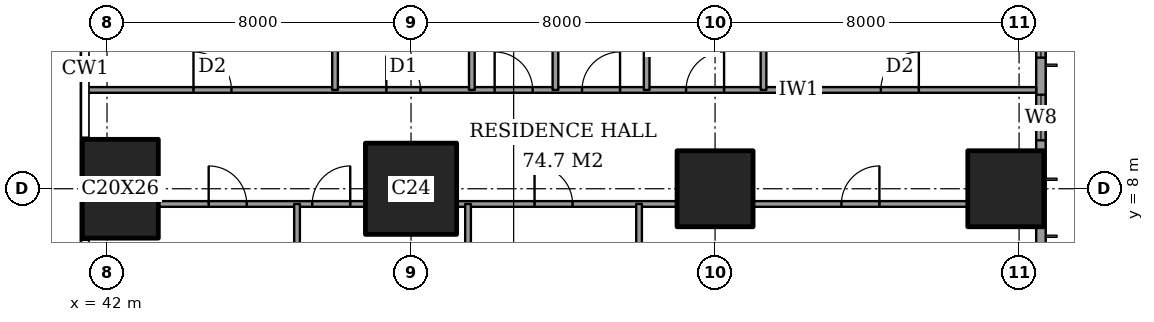
"""IFC4 building model, lengths in metres.
Left out: names, types, materials, properties, quantities, classifications, styles, units other than length and angle.
Written with IfcOpenShell. Run it as: python <this file> out.ifc"""

import sys

from ifc_helpers import new_model, si_unit, direction, frame, frame_2d, origin, origin_2d, place, context, subcontext, project, spatial, rectangle, extrude, element, fill, save


model = new_model("IFC4")
c1 = context("Model", 3, precision=1e-05, world=origin(), true_north=direction((0.0, 1.0)))
c2 = subcontext(c1, "Body", "Model", "MODEL_VIEW")
j1 = project(units=[si_unit("LENGTHUNIT", "METRE"), si_unit("PLANEANGLEUNIT", "RADIAN")], contexts=[c1])
p1 = place(None, origin())
s1 = spatial("IfcSite", under=j1, at=p1, CompositionType="ELEMENT")
p2 = place(p1, origin())
s2 = spatial("IfcBuilding", under=s1, at=p2, CompositionType="ELEMENT")
p3 = place(p2, frame((0.0, 0.0, 29.6)))
s3 = spatial("IfcBuildingStorey", under=s2, at=p3, CompositionType="ELEMENT", Elevation=29.6)
p4 = place(p3, frame((42.35, 8.0, 0.0), z_axis=(0.0, 0.0, 1.0), x_axis=(1.0, 0.0, 0.0)))
e1 = element("IfcColumn", 1, at=p4, inside=s3, PredefinedType="COLUMN", context=c2, shape_type="SweptSolid", body=[
    extrude(rectangle(XDim=2.0, YDim=2.6, at=origin_2d()), origin(), (0.0, 0.0, 1.0), 3.6),
])
p5 = place(p3, frame((50.0, 8.0, 0.0), z_axis=(0.0, 0.0, 1.0), x_axis=(1.0, 0.0, 0.0)))
e2 = element("IfcColumn", 2, at=p5, inside=s3, PredefinedType="COLUMN", context=c2, shape_type="SweptSolid", body=[
    extrude(rectangle(XDim=2.4, YDim=2.4, at=origin_2d()), origin(), (0.0, 0.0, 1.0), 3.6),
])
for number, where, z_axis, x_axis in (
    (3, (58.0, 8.0, 0.0), (0.0, 0.0, 1.0), (1.0, 0.0, 0.0)),
    (4, (65.65, 8.0, 0.0), (0.0, 0.0, 1.0), (1.0, 0.0, 0.0)),
):
    element("IfcColumn", number, at=place(p3, frame(where, z_axis=z_axis, x_axis=x_axis)), inside=s3, PredefinedType="COLUMN", context=c2, shape_type="SweptSolid", body=[
        extrude(rectangle(XDim=2.0, YDim=2.0, at=origin_2d()), origin(), (0.0, 0.0, 1.0), 3.6),
    ])
p6 = place(p3, frame((66.575, 3.175, 0.0), z_axis=(0.0, 0.0, 1.0), x_axis=(0.0, 1.0, 0.0)))
e5 = element("IfcWall", 5, at=p6, inside=s3, PredefinedType="SOLIDWALL", context=c2, shape_type="SweptSolid", body=[
    extrude(rectangle(XDim=41.65, YDim=0.25, at=frame_2d((20.825, 0.0))), origin(), (0.0, 0.0, 1.0), 3.6),
])
p7 = place(p6, frame((0.775, 0.0, 0.6)))
e6 = element("IfcOpeningElement", 6, at=p7, cuts=e5, PredefinedType="OPENING", context=c2, shape_type="SweptSolid", body=[
    extrude(rectangle(XDim=2.4, YDim=2.0, at=frame_2d((1.2, 1.0))), frame((0.0, 0.135, 0.0), z_axis=(0.0, -1.0, 0.0), x_axis=(1.0, 0.0, 0.0)), (0.0, 0.0, 1.0), 0.27),
])
p8 = place(p6, frame((6.1, 0.0, 0.6)))
e7 = element("IfcOpeningElement", 7, at=p8, cuts=e5, PredefinedType="OPENING", context=c2, shape_type="SweptSolid", body=[
    extrude(rectangle(XDim=1.2, YDim=2.0, at=frame_2d((0.6, 1.0))), frame((0.0, 0.135, 0.0), z_axis=(0.0, -1.0, 0.0), x_axis=(1.0, 0.0, 0.0)), (0.0, 0.0, 1.0), 0.27),
])
p9 = place(p6, frame((8.275, 0.0, 0.6)))
e8 = element("IfcOpeningElement", 8, at=p9, cuts=e5, PredefinedType="OPENING", context=c2, shape_type="SweptSolid", body=[
    extrude(rectangle(XDim=2.4, YDim=2.0, at=frame_2d((1.2, 1.0))), frame((0.0, 0.135, 0.0), z_axis=(0.0, -1.0, 0.0), x_axis=(1.0, 0.0, 0.0)), (0.0, 0.0, 1.0), 0.27),
])
p10 = place(p6, frame((15.775, 0.0, 0.6)))
e9 = element("IfcOpeningElement", 9, at=p10, cuts=e5, PredefinedType="OPENING", context=c2, shape_type="SweptSolid", body=[
    extrude(rectangle(XDim=2.4, YDim=2.0, at=frame_2d((1.2, 1.0))), frame((0.0, 0.135, 0.0), z_axis=(0.0, -1.0, 0.0), x_axis=(1.0, 0.0, 0.0)), (0.0, 0.0, 1.0), 0.27),
])
p11 = place(p6, frame((23.475, 0.0, 0.6)))
e10 = element("IfcOpeningElement", 10, at=p11, cuts=e5, PredefinedType="OPENING", context=c2, shape_type="SweptSolid", body=[
    extrude(rectangle(XDim=2.4, YDim=2.0, at=frame_2d((1.2, 1.0))), frame((0.0, 0.135, 0.0), z_axis=(0.0, -1.0, 0.0), x_axis=(1.0, 0.0, 0.0)), (0.0, 0.0, 1.0), 0.27),
])
p12 = place(p6, frame((30.975, 0.0, 0.6)))
e11 = element("IfcOpeningElement", 11, at=p12, cuts=e5, PredefinedType="OPENING", context=c2, shape_type="SweptSolid", body=[
    extrude(rectangle(XDim=2.4, YDim=2.0, at=frame_2d((1.2, 1.0))), frame((0.0, 0.135, 0.0), z_axis=(0.0, -1.0, 0.0), x_axis=(1.0, 0.0, 0.0)), (0.0, 0.0, 1.0), 0.27),
])
p13 = place(p6, frame((34.5, 0.0, 0.6)))
e12 = element("IfcOpeningElement", 12, at=p13, cuts=e5, PredefinedType="OPENING", context=c2, shape_type="SweptSolid", body=[
    extrude(rectangle(XDim=1.2, YDim=2.0, at=frame_2d((0.6, 1.0))), frame((0.0, 0.135, 0.0), z_axis=(0.0, -1.0, 0.0), x_axis=(1.0, 0.0, 0.0)), (0.0, 0.0, 1.0), 0.27),
])
p14 = place(p6, frame((38.475, 0.0, 0.6)))
e13 = element("IfcOpeningElement", 13, at=p14, cuts=e5, PredefinedType="OPENING", context=c2, shape_type="SweptSolid", body=[
    extrude(rectangle(XDim=2.4, YDim=2.0, at=frame_2d((1.2, 1.0))), frame((0.0, 0.135, 0.0), z_axis=(0.0, -1.0, 0.0), x_axis=(1.0, 0.0, 0.0)), (0.0, 0.0, 1.0), 0.27),
])
p15 = place(p3, frame((43.35, 7.6, 0.0), z_axis=(0.0, 0.0, 1.0), x_axis=(1.0, 0.0, 0.0)))
e14 = element("IfcWall", 14, at=p15, inside=s3, PredefinedType="PARTITIONING", context=c2, shape_type="SweptSolid", body=[
    extrude(rectangle(XDim=5.45, YDim=0.15, at=frame_2d((2.725, 0.0))), origin(), (0.0, 0.0, 1.0), 3.35),
])
p16 = place(p15, frame((4.05, 0.0, 0.0)))
e15 = element("IfcOpeningElement", 15, at=p16, cuts=e14, PredefinedType="OPENING", context=c2, shape_type="SweptSolid", body=[
    extrude(rectangle(XDim=1.0, YDim=2.1, at=frame_2d((0.5, 1.05))), frame((0.0, 0.085, 0.0), z_axis=(0.0, -1.0, 0.0), x_axis=(1.0, 0.0, 0.0)), (0.0, 0.0, 1.0), 0.17),
])
p17 = place(p15, frame((1.325, 0.0, 0.0)))
e16 = element("IfcOpeningElement", 16, at=p17, cuts=e14, PredefinedType="OPENING", context=c2, shape_type="SweptSolid", body=[
    extrude(rectangle(XDim=1.0, YDim=2.1, at=frame_2d((0.5, 1.05))), frame((0.0, 0.085, 0.0), z_axis=(0.0, -1.0, 0.0), x_axis=(1.0, 0.0, 0.0)), (0.0, 0.0, 1.0), 0.17),
])
p18 = place(p3, frame((51.2, 7.6, 0.0), z_axis=(0.0, 0.0, 1.0), x_axis=(1.0, 0.0, 0.0)))
e17 = element("IfcWall", 17, at=p18, inside=s3, PredefinedType="PARTITIONING", context=c2, shape_type="SweptSolid", body=[
    extrude(rectangle(XDim=5.8, YDim=0.15, at=frame_2d((2.9, 0.0))), origin(), (0.0, 0.0, 1.0), 3.35),
])
p19 = place(p18, frame((2.05, 0.0, 0.0)))
e18 = element("IfcOpeningElement", 18, at=p19, cuts=e17, PredefinedType="OPENING", context=c2, shape_type="SweptSolid", body=[
    extrude(rectangle(XDim=1.0, YDim=2.1, at=frame_2d((0.5, 1.05))), frame((0.0, 0.085, 0.0), z_axis=(0.0, -1.0, 0.0), x_axis=(1.0, 0.0, 0.0)), (0.0, 0.0, 1.0), 0.17),
])
p20 = place(p3, frame((59.0, 7.6, 0.0), z_axis=(0.0, 0.0, 1.0), x_axis=(1.0, 0.0, 0.0)))
e19 = element("IfcWall", 19, at=p20, inside=s3, PredefinedType="PARTITIONING", context=c2, shape_type="SweptSolid", body=[
    extrude(rectangle(XDim=5.65, YDim=0.15, at=frame_2d((2.825, 0.0))), origin(), (0.0, 0.0, 1.0), 3.35),
])
p21 = place(p20, frame((2.325, 0.0, 0.0)))
e20 = element("IfcOpeningElement", 20, at=p21, cuts=e19, PredefinedType="OPENING", context=c2, shape_type="SweptSolid", body=[
    extrude(rectangle(XDim=1.0, YDim=2.1, at=frame_2d((0.5, 1.05))), frame((0.0, 0.085, 0.0), z_axis=(0.0, -1.0, 0.0), x_axis=(1.0, 0.0, 0.0)), (0.0, 0.0, 1.0), 0.17),
])
p22 = place(p3, frame((41.439, 10.6, 0.0), z_axis=(0.0, 0.0, 1.0), x_axis=(1.0, 0.0, 0.0)))
e21 = element("IfcWall", 21, at=p22, inside=s3, PredefinedType="PARTITIONING", context=c2, shape_type="SweptSolid", body=[
    extrude(rectangle(XDim=25.011, YDim=0.15, at=frame_2d((12.505, 0.0))), origin(), (0.0, 0.0, 1.0), 3.35),
])
p23 = place(p22, frame((10.761, 0.0, 0.0)))
e22 = element("IfcOpeningElement", 22, at=p23, cuts=e21, PredefinedType="OPENING", context=c2, shape_type="SweptSolid", body=[
    extrude(rectangle(XDim=1.0, YDim=2.1, at=frame_2d((0.5, 1.05))), frame((0.0, 0.085, 0.0), z_axis=(0.0, -1.0, 0.0), x_axis=(1.0, 0.0, 0.0)), (0.0, 0.0, 1.0), 0.17),
])
p24 = place(p22, frame((20.924, 0.0, 0.0)))
e23 = element("IfcOpeningElement", 23, at=p24, cuts=e21, PredefinedType="OPENING", context=c2, shape_type="SweptSolid", body=[
    extrude(rectangle(XDim=1.0, YDim=2.1, at=frame_2d((0.5, 1.05))), frame((0.0, 0.085, 0.0), z_axis=(0.0, -1.0, 0.0), x_axis=(1.0, 0.0, 0.0)), (0.0, 0.0, 1.0), 0.17),
])
p25 = place(p22, frame((15.799, 0.0, 0.0)))
e24 = element("IfcOpeningElement", 24, at=p25, cuts=e21, PredefinedType="OPENING", context=c2, shape_type="SweptSolid", body=[
    extrude(rectangle(XDim=1.0, YDim=2.1, at=frame_2d((0.5, 1.05))), frame((0.0, 0.085, 0.0), z_axis=(0.0, -1.0, 0.0), x_axis=(1.0, 0.0, 0.0)), (0.0, 0.0, 1.0), 0.17),
])
p26 = place(p22, frame((13.061, 0.0, 0.0)))
e25 = element("IfcOpeningElement", 25, at=p26, cuts=e21, PredefinedType="OPENING", context=c2, shape_type="SweptSolid", body=[
    extrude(rectangle(XDim=1.0, YDim=2.1, at=frame_2d((0.5, 1.05))), frame((0.0, 0.085, 0.0), z_axis=(0.0, -1.0, 0.0), x_axis=(1.0, 0.0, 0.0)), (0.0, 0.0, 1.0), 0.17),
])
p27 = place(p22, frame((7.911, 0.0, 0.0)))
e26 = element("IfcOpeningElement", 26, at=p27, cuts=e21, PredefinedType="OPENING", context=c2, shape_type="SweptSolid", body=[
    extrude(rectangle(XDim=0.9, YDim=2.1, at=frame_2d((0.45, 1.05))), frame((0.0, 0.085, 0.0), z_axis=(0.0, -1.0, 0.0), x_axis=(1.0, 0.0, 0.0)), (0.0, 0.0, 1.0), 0.17),
])
p28 = place(p22, frame((2.836, 0.0, 0.0)))
e27 = element("IfcOpeningElement", 27, at=p28, cuts=e21, PredefinedType="OPENING", context=c2, shape_type="SweptSolid", body=[
    extrude(rectangle(XDim=1.0, YDim=2.1, at=frame_2d((0.5, 1.05))), frame((0.0, 0.085, 0.0), z_axis=(0.0, -1.0, 0.0), x_axis=(1.0, 0.0, 0.0)), (0.0, 0.0, 1.0), 0.17),
])
p29 = place(p3, frame((47.0, -0.45, 0.0), z_axis=(0.0, 0.0, 1.0), x_axis=(0.0, 1.0, 0.0)))
e28 = element("IfcWall", 28, at=p29, inside=s3, PredefinedType="PARTITIONING", context=c2, shape_type="SweptSolid", body=[
    extrude(rectangle(XDim=8.05, YDim=0.15, at=frame_2d((4.025, 0.0))), origin(), (0.0, 0.0, 1.0), 3.35),
])
p30 = place(p3, frame((48.0, 10.6, 0.0), z_axis=(0.0, 0.0, 1.0), x_axis=(0.0, 1.0, 0.0)))
e29 = element("IfcWall", 29, at=p30, inside=s3, PredefinedType="PARTITIONING", context=c2, shape_type="SweptSolid", body=[
    extrude(rectangle(XDim=13.4, YDim=0.15, at=frame_2d((6.7, 0.0))), origin(), (0.0, 0.0, 1.0), 3.35),
])
p31 = place(p30, frame((10.8, 0.0, 0.0)))
e30 = element("IfcOpeningElement", 30, at=p31, cuts=e29, PredefinedType="OPENING", context=c2, shape_type="SweptSolid", body=[
    extrude(rectangle(XDim=1.2, YDim=2.4, at=frame_2d((0.6, 1.2))), frame((0.0, 0.085, 0.0), z_axis=(0.0, -1.0, 0.0), x_axis=(1.0, 0.0, 0.0)), (0.0, 0.0, 1.0), 0.17),
])
p32 = place(p30, frame((6.7, 0.0, 0.0)))
e31 = element("IfcOpeningElement", 31, at=p32, cuts=e29, PredefinedType="OPENING", context=c2, shape_type="SweptSolid", body=[
    extrude(rectangle(XDim=0.9, YDim=2.1, at=frame_2d((0.45, 1.05))), frame((0.0, 0.085, 0.0), z_axis=(0.0, -1.0, 0.0), x_axis=(1.0, 0.0, 0.0)), (0.0, 0.0, 1.0), 0.17),
])
p33 = place(p3, frame((51.5, -0.45, 0.0), z_axis=(0.0, 0.0, 1.0), x_axis=(0.0, 1.0, 0.0)))
e32 = element("IfcWall", 32, at=p33, inside=s3, PredefinedType="PARTITIONING", context=c2, shape_type="SweptSolid", body=[
    extrude(rectangle(XDim=8.05, YDim=0.15, at=frame_2d((4.025, 0.0))), origin(), (0.0, 0.0, 1.0), 3.35),
])
for number, where, z_axis, x_axis in (
    (33, (51.6, 10.6, 0.0), (0.0, 0.0, 1.0), (0.0, 1.0, 0.0)),
    (34, (53.8, 10.6, 0.0), (0.0, 0.0, 1.0), (0.0, 1.0, 0.0)),
):
    element("IfcWall", number, at=place(p3, frame(where, z_axis=z_axis, x_axis=x_axis)), inside=s3, PredefinedType="PARTITIONING", context=c2, shape_type="SweptSolid", body=[
        extrude(rectangle(XDim=4.0, YDim=0.15, at=frame_2d((2.0, 0.0))), origin(), (0.0, 0.0, 1.0), 3.35),
    ])
p34 = place(p3, frame((56.0, -0.45, 0.0), z_axis=(0.0, 0.0, 1.0), x_axis=(0.0, 1.0, 0.0)))
e35 = element("IfcWall", 35, at=p34, inside=s3, PredefinedType="PARTITIONING", context=c2, shape_type="SweptSolid", body=[
    extrude(rectangle(XDim=8.05, YDim=0.15, at=frame_2d((4.025, 0.0))), origin(), (0.0, 0.0, 1.0), 3.35),
])
p35 = place(p3, frame((56.2, 10.6, 0.0), z_axis=(0.0, 0.0, 1.0), x_axis=(0.0, 1.0, 0.0)))
e36 = element("IfcWall", 36, at=p35, inside=s3, PredefinedType="PARTITIONING", context=c2, shape_type="SweptSolid", body=[
    extrude(rectangle(XDim=11.0, YDim=0.15, at=frame_2d((5.5, 0.0))), origin(), (0.0, 0.0, 1.0), 3.35),
])
p36 = place(p35, frame((7.0, 0.0, 0.0)))
e37 = element("IfcOpeningElement", 37, at=p36, cuts=e36, PredefinedType="OPENING", context=c2, shape_type="SweptSolid", body=[
    extrude(rectangle(XDim=1.0, YDim=2.1, at=frame_2d((0.5, 1.05))), frame((0.0, 0.085, 0.0), z_axis=(0.0, -1.0, 0.0), x_axis=(1.0, 0.0, 0.0)), (0.0, 0.0, 1.0), 0.17),
])
p37 = place(p3, frame((59.275, 10.6, 0.0), z_axis=(0.0, 0.0, 1.0), x_axis=(0.0, 1.0, 0.0)))
e38 = element("IfcWall", 38, at=p37, inside=s3, PredefinedType="PARTITIONING", context=c2, shape_type="SweptSolid", body=[
    extrude(rectangle(XDim=4.2, YDim=0.15, at=frame_2d((2.1, 0.0))), origin(), (0.0, 0.0, 1.0), 3.35),
])
p38 = place(p8, origin())
e39 = element("IfcWindow", 39, at=p38, inside=s3, PartitioningType="SINGLE_PANEL", PredefinedType="WINDOW", context=c2, shape_type="SweptSolid", body=[
    extrude(rectangle(XDim=1.2, YDim=2.0, at=frame_2d((0.6, 1.0))), frame((0.0, 0.03, 0.0), z_axis=(0.0, -1.0, 0.0), x_axis=(1.0, 0.0, 0.0)), (0.0, 0.0, 1.0), 0.06),
])
fill(e7, e39)
p39 = place(p9, origin())
e40 = element("IfcWindow", 40, at=p39, inside=s3, PartitioningType="SINGLE_PANEL", PredefinedType="WINDOW", context=c2, shape_type="SweptSolid", body=[
    extrude(rectangle(XDim=2.4, YDim=2.0, at=frame_2d((1.2, 1.0))), frame((0.0, 0.03, 0.0), z_axis=(0.0, -1.0, 0.0), x_axis=(1.0, 0.0, 0.0)), (0.0, 0.0, 1.0), 0.06),
])
fill(e8, e40)
p40 = place(p21, origin())
e41 = element("IfcDoor", 41, at=p40, inside=s3, OperationType="SINGLE_SWING_LEFT", PredefinedType="DOOR", context=c2, shape_type="SweptSolid", body=[
    extrude(rectangle(XDim=1.0, YDim=2.1, at=frame_2d((0.5, 1.05))), frame((0.0, 0.025, 0.0), z_axis=(0.0, -1.0, 0.0), x_axis=(1.0, 0.0, 0.0)), (0.0, 0.0, 1.0), 0.05),
])
fill(e20, e41)
p41 = place(p19, origin())
e42 = element("IfcDoor", 42, at=p41, inside=s3, OperationType="SINGLE_SWING_RIGHT", PredefinedType="DOOR", context=c2, shape_type="SweptSolid", body=[
    extrude(rectangle(XDim=1.0, YDim=2.1, at=frame_2d((0.5, 1.05))), frame((0.0, 0.025, 0.0), z_axis=(0.0, -1.0, 0.0), x_axis=(1.0, 0.0, 0.0)), (0.0, 0.0, 1.0), 0.05),
])
fill(e18, e42)
p42 = place(p16, origin())
e43 = element("IfcDoor", 43, at=p42, inside=s3, OperationType="SINGLE_SWING_LEFT", PredefinedType="DOOR", context=c2, shape_type="SweptSolid", body=[
    extrude(rectangle(XDim=1.0, YDim=2.1, at=frame_2d((0.5, 1.05))), frame((0.0, 0.025, 0.0), z_axis=(0.0, -1.0, 0.0), x_axis=(1.0, 0.0, 0.0)), (0.0, 0.0, 1.0), 0.05),
])
fill(e15, e43)
p43 = place(p17, origin())
e44 = element("IfcDoor", 44, at=p43, inside=s3, OperationType="SINGLE_SWING_RIGHT", PredefinedType="DOOR", context=c2, shape_type="SweptSolid", body=[
    extrude(rectangle(XDim=1.0, YDim=2.1, at=frame_2d((0.5, 1.05))), frame((0.0, 0.025, 0.0), z_axis=(0.0, -1.0, 0.0), x_axis=(1.0, 0.0, 0.0)), (0.0, 0.0, 1.0), 0.05),
])
fill(e16, e44)
p44 = place(p23, origin())
e45 = element("IfcDoor", 45, at=p44, inside=s3, OperationType="SINGLE_SWING_RIGHT", PredefinedType="DOOR", context=c2, shape_type="SweptSolid", body=[
    extrude(rectangle(XDim=1.0, YDim=2.1, at=frame_2d((0.5, 1.05))), frame((0.0, 0.025, 0.0), z_axis=(0.0, -1.0, 0.0), x_axis=(1.0, 0.0, 0.0)), (0.0, 0.0, 1.0), 0.05),
])
fill(e22, e45)
p45 = place(p24, origin())
e46 = element("IfcDoor", 46, at=p45, inside=s3, OperationType="SINGLE_SWING_LEFT", PredefinedType="DOOR", context=c2, shape_type="SweptSolid", body=[
    extrude(rectangle(XDim=1.0, YDim=2.1, at=frame_2d((0.5, 1.05))), frame((0.0, 0.025, 0.0), z_axis=(0.0, -1.0, 0.0), x_axis=(1.0, 0.0, 0.0)), (0.0, 0.0, 1.0), 0.05),
])
fill(e23, e46)
p46 = place(p25, origin())
e47 = element("IfcDoor", 47, at=p46, inside=s3, OperationType="SINGLE_SWING_LEFT", PredefinedType="DOOR", context=c2, shape_type="SweptSolid", body=[
    extrude(rectangle(XDim=1.0, YDim=2.1, at=frame_2d((0.5, 1.05))), frame((0.0, 0.025, 0.0), z_axis=(0.0, -1.0, 0.0), x_axis=(1.0, 0.0, 0.0)), (0.0, 0.0, 1.0), 0.05),
])
fill(e24, e47)
p47 = place(p26, origin())
e48 = element("IfcDoor", 48, at=p47, inside=s3, OperationType="SINGLE_SWING_LEFT", PredefinedType="DOOR", context=c2, shape_type="SweptSolid", body=[
    extrude(rectangle(XDim=1.0, YDim=2.1, at=frame_2d((0.5, 1.05))), frame((0.0, 0.025, 0.0), z_axis=(0.0, -1.0, 0.0), x_axis=(1.0, 0.0, 0.0)), (0.0, 0.0, 1.0), 0.05),
])
fill(e25, e48)
p48 = place(p27, origin())
e49 = element("IfcDoor", 49, at=p48, inside=s3, OperationType="SINGLE_SWING_RIGHT", PredefinedType="DOOR", context=c2, shape_type="SweptSolid", body=[
    extrude(rectangle(XDim=0.9, YDim=2.1, at=frame_2d((0.45, 1.05))), frame((0.0, 0.025, 0.0), z_axis=(0.0, -1.0, 0.0), x_axis=(1.0, 0.0, 0.0)), (0.0, 0.0, 1.0), 0.05),
])
fill(e26, e49)
p49 = place(p28, origin())
e50 = element("IfcDoor", 50, at=p49, inside=s3, OperationType="SINGLE_SWING_RIGHT", PredefinedType="DOOR", context=c2, shape_type="SweptSolid", body=[
    extrude(rectangle(XDim=1.0, YDim=2.1, at=frame_2d((0.5, 1.05))), frame((0.0, 0.025, 0.0), z_axis=(0.0, -1.0, 0.0), x_axis=(1.0, 0.0, 0.0)), (0.0, 0.0, 1.0), 0.05),
])
fill(e27, e50)
save(model, sys.argv[1])
